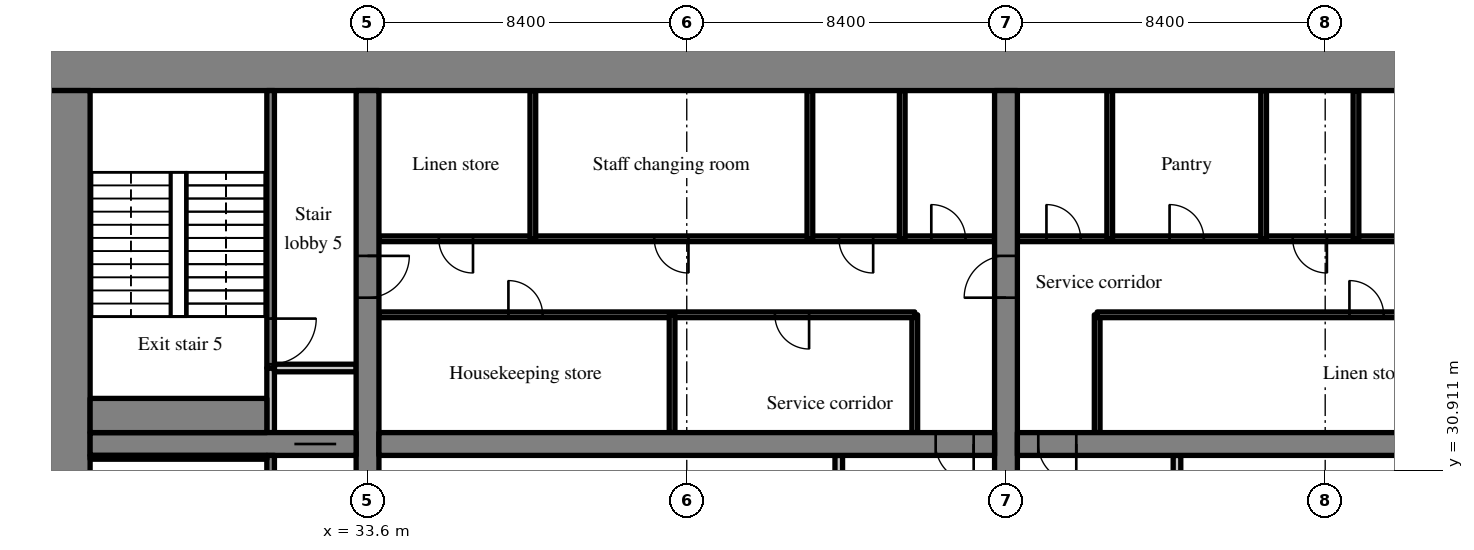
"""IFC4 building model, lengths in metres.
Left out: names, types, materials, properties, quantities, classifications, styles, units other than length and angle.
Written with IfcOpenShell. Run it as: python <this file> out.ifc"""

import sys

from ifc_helpers import new_model, si_unit, direction, frame, frame_2d, origin, place, context, subcontext, project, spatial, rectangle, extrude, source, transform, mapped, element, fill, save


model = new_model("IFC4")
c1 = context("Model", 3, precision=1e-05, world=origin(), true_north=direction((0.0, 1.0)))
c2 = subcontext(c1, "Body", "Model", "MODEL_VIEW")
j1 = project(units=[si_unit("LENGTHUNIT", "METRE"), si_unit("PLANEANGLEUNIT", "RADIAN")], contexts=[c1])
p1 = place(None, origin())
s1 = spatial("IfcSite", under=j1, at=p1, CompositionType="ELEMENT")
p2 = place(p1, origin())
s2 = spatial("IfcBuilding", under=s1, at=p2, CompositionType="ELEMENT")
p3 = place(p2, frame((0.0, 0.0, 27.8)))
s3 = spatial("IfcBuildingStorey", under=s2, at=p3, CompositionType="ELEMENT", Elevation=27.8)
m1 = source(origin(), c2, "Body", "SweptSolid", [
    extrude(rectangle(XDim=50.4, YDim=1.1, at=frame_2d((25.2, 0.0))), origin(), (0.0, 0.0, 1.0), 3.52),
])
p4 = place(p3, frame((25.2, 41.45, 0.0), z_axis=(0.0, 0.0, 1.0), x_axis=(1.0, 0.0, 0.0)))
e1 = element("IfcWall", 1, at=p4, inside=s3, PredefinedType="SHEAR", context=c2, shape_type="MappedRepresentation", body=[
    mapped(m1, transform((0.0, 0.0, 0.0), scale=1.0)),
])
m2 = source(origin(), c2, "Body", "SweptSolid", [
    extrude(rectangle(XDim=17.8, YDim=1.1, at=frame_2d((8.9, 0.0))), origin(), (0.0, 0.0, 1.0), 3.52),
])
p5 = place(p3, frame((25.75, 23.1, 0.0), z_axis=(0.0, 0.0, 1.0), x_axis=(0.0, 1.0, 0.0)))
e2 = element("IfcWall", 2, at=p5, inside=s3, PredefinedType="SHEAR", context=c2, shape_type="MappedRepresentation", body=[
    mapped(m2, transform((0.0, 0.0, 0.0), scale=1.0)),
])
m3 = source(origin(), c2, "Body", "SweptSolid", [
    extrude(rectangle(XDim=17.8, YDim=0.6, at=frame_2d((8.9, 0.0))), origin(), (0.0, 0.0, 1.0), 3.52),
])
p6 = place(p3, frame((33.6, 23.1, 0.0), z_axis=(0.0, 0.0, 1.0), x_axis=(0.0, 1.0, 0.0)))
e3 = element("IfcWall", 3, at=p6, inside=s3, PredefinedType="SHEAR", context=c2, shape_type="MappedRepresentation", body=[
    mapped(m3, transform((0.0, 0.0, 0.0), scale=1.0)),
])
m4 = source(origin(), c2, "Body", "SweptSolid", [
    extrude(rectangle(XDim=1.1, YDim=2.1, at=frame_2d((0.55, 1.05))), frame((0.0, 0.31, 0.0), z_axis=(0.0, -1.0, 0.0), x_axis=(1.0, 0.0, 0.0)), (0.0, 0.0, 1.0), 0.62),
])
p7 = place(p6, frame((12.35, 0.0, 0.0)))
e4 = element("IfcOpeningElement", 4, at=p7, cuts=e3, PredefinedType="OPENING", context=c2, shape_type="MappedRepresentation", body=[
    mapped(m4, transform((0.0, 0.0, 0.0), scale=1.0)),
])
p8 = place(p3, frame((50.4, 23.1, 0.0), z_axis=(0.0, 0.0, 1.0), x_axis=(0.0, 1.0, 0.0)))
e5 = element("IfcWall", 5, at=p8, inside=s3, PredefinedType="SHEAR", context=c2, shape_type="MappedRepresentation", body=[
    mapped(m3, transform((0.0, 0.0, 0.0), scale=1.0)),
])
p9 = place(p8, frame((12.35, 0.0, 0.0)))
e6 = element("IfcOpeningElement", 6, at=p9, cuts=e5, PredefinedType="OPENING", context=c2, shape_type="MappedRepresentation", body=[
    mapped(m4, transform((0.0, 0.0, 0.0), scale=1.0)),
])
m5 = source(origin(), c2, "Body", "SweptSolid", [
    extrude(rectangle(XDim=7.0, YDim=0.6, at=frame_2d((3.5, 0.0))), origin(), (0.0, 0.0, 1.0), 3.52),
])
p10 = place(p3, frame((26.3, 31.6, 0.0), z_axis=(0.0, 0.0, 1.0), x_axis=(1.0, 0.0, 0.0)))
e7 = element("IfcWall", 7, at=p10, inside=s3, PredefinedType="SHEAR", context=c2, shape_type="MappedRepresentation", body=[
    mapped(m5, transform((0.0, 0.0, 0.0), scale=1.0)),
])
p11 = place(p10, frame((5.375, 0.0, 0.0)))
e8 = element("IfcOpeningElement", 8, at=p11, cuts=e7, PredefinedType="OPENING", context=c2, shape_type="MappedRepresentation", body=[
    mapped(m4, transform((0.0, 0.0, 0.0), scale=1.0)),
])
m6 = source(origin(), c2, "Body", "SweptSolid", [
    extrude(rectangle(XDim=16.2, YDim=0.6, at=frame_2d((8.1, 0.0))), origin(), (0.0, 0.0, 1.0), 3.52),
])
p12 = place(p3, frame((33.9, 31.6, 0.0), z_axis=(0.0, 0.0, 1.0), x_axis=(1.0, 0.0, 0.0)))
e9 = element("IfcWall", 9, at=p12, inside=s3, PredefinedType="SHEAR", context=c2, shape_type="MappedRepresentation", body=[
    mapped(m6, transform((0.0, 0.0, 0.0), scale=1.0)),
])
m7 = source(origin(), c2, "Body", "SweptSolid", [
    extrude(rectangle(XDim=1.0, YDim=2.1, at=frame_2d((0.5, 1.05))), frame((0.0, 0.31, 0.0), z_axis=(0.0, -1.0, 0.0), x_axis=(1.0, 0.0, 0.0)), (0.0, 0.0, 1.0), 0.62),
])
p13 = place(p12, frame((14.65, 0.0, 0.0)))
e10 = element("IfcOpeningElement", 10, at=p13, cuts=e9, PredefinedType="OPENING", context=c2, shape_type="MappedRepresentation", body=[
    mapped(m7, transform((0.0, 0.0, 0.0), scale=1.0)),
])
m8 = source(origin(), c2, "Body", "SweptSolid", [
    extrude(rectangle(XDim=16.2, YDim=0.6, at=frame_2d((8.1, 0.0))), origin(), (0.0, 0.0, 1.0), 3.52),
])
p14 = place(p3, frame((50.7, 31.6, 0.0), z_axis=(0.0, 0.0, 1.0), x_axis=(1.0, 0.0, 0.0)))
e11 = element("IfcWall", 11, at=p14, inside=s3, PredefinedType="SHEAR", context=c2, shape_type="MappedRepresentation", body=[
    mapped(m8, transform((0.0, 0.0, 0.0), scale=1.0)),
])
p15 = place(p14, frame((0.55, 0.0, 0.0)))
e12 = element("IfcOpeningElement", 12, at=p15, cuts=e11, PredefinedType="OPENING", context=c2, shape_type="MappedRepresentation", body=[
    mapped(m7, transform((0.0, 0.0, 0.0), scale=1.0)),
])
m9 = source(origin(), c2, "Body", "SweptSolid", [
    extrude(rectangle(XDim=3.559, YDim=0.3, at=frame_2d((1.78, 0.0))), origin(), (0.0, 0.0, 1.0), 3.52),
])
p16 = place(p3, frame((25.55, 39.969, 0.0), z_axis=(0.0, 0.0, 1.0), x_axis=(-0.35779745313, 0.933799219604, 0.0)))
e13 = element("IfcWall", 13, at=p16, inside=s3, PredefinedType="SOLIDWALL", context=c2, shape_type="MappedRepresentation", body=[
    mapped(m9, transform((0.0, 0.0, 0.0), scale=1.0)),
])
m10 = source(origin(), c2, "Body", "SweptSolid", [
    extrude(rectangle(XDim=1.5, YDim=2.0, at=frame_2d((0.75, 1.0))), frame((0.0, 0.16, 0.0), z_axis=(0.0, -1.0, 0.0), x_axis=(1.0, 0.0, 0.0)), (0.0, 0.0, 1.0), 0.32),
])
p17 = place(p16, frame((1.903, 0.0, 0.9)))
e14 = element("IfcOpeningElement", 14, at=p17, cuts=e13, PredefinedType="OPENING", context=c2, shape_type="MappedRepresentation", body=[
    mapped(m10, transform((0.0, 0.0, 0.0), scale=1.0)),
])
m11 = source(origin(), c2, "Body", "SweptSolid", [
    extrude(rectangle(XDim=2.5, YDim=0.2, at=frame_2d((1.25, 0.0))), origin(), (0.0, 0.0, 1.0), 3.52),
])
p18 = place(p3, frame((46.0, 28.8, 0.0), z_axis=(0.0, 0.0, 1.0), x_axis=(0.0, 1.0, 0.0)))
e15 = element("IfcWall", 15, at=p18, inside=s3, PredefinedType="SOLIDWALL", context=c2, shape_type="MappedRepresentation", body=[
    mapped(m11, transform((0.0, 0.0, 0.0), scale=1.0)),
])
m12 = source(origin(), c2, "Body", "SweptSolid", [
    extrude(rectangle(XDim=3.1, YDim=0.15, at=frame_2d((1.55, 0.0))), origin(), (0.0, 0.0, 1.0), 3.52),
])
p19 = place(p3, frame((48.0, 31.9, 0.0), z_axis=(0.0, 0.0, 1.0), x_axis=(0.0, 1.0, 0.0)))
e16 = element("IfcWall", 16, at=p19, inside=s3, PredefinedType="PARTITIONING", context=c2, shape_type="MappedRepresentation", body=[
    mapped(m12, transform((0.0, 0.0, 0.0), scale=1.0)),
])
m13 = source(origin(), c2, "Body", "SweptSolid", [
    extrude(rectangle(XDim=14.1, YDim=0.15, at=frame_2d((7.05, 0.0))), origin(), (0.0, 0.0, 1.0), 3.52),
])
p20 = place(p3, frame((33.9, 35.0, 0.0), z_axis=(0.0, 0.0, 1.0), x_axis=(1.0, 0.0, 0.0)))
e17 = element("IfcWall", 17, at=p20, inside=s3, PredefinedType="PARTITIONING", context=c2, shape_type="MappedRepresentation", body=[
    mapped(m13, transform((0.0, 0.0, 0.0), scale=1.0)),
])
m14 = source(origin(), c2, "Body", "SweptSolid", [
    extrude(rectangle(XDim=0.9, YDim=2.1, at=frame_2d((0.45, 1.05))), frame((0.0, 0.085, 0.0), z_axis=(0.0, -1.0, 0.0), x_axis=(1.0, 0.0, 0.0)), (0.0, 0.0, 1.0), 0.17),
])
p21 = place(p20, frame((3.407, 0.0, 0.0)))
e18 = element("IfcOpeningElement", 18, at=p21, cuts=e17, PredefinedType="OPENING", context=c2, shape_type="MappedRepresentation", body=[
    mapped(m14, transform((0.0, 0.0, 0.0), scale=1.0)),
])
p22 = place(p20, frame((10.419, 0.0, 0.0)))
e19 = element("IfcOpeningElement", 19, at=p22, cuts=e17, PredefinedType="OPENING", context=c2, shape_type="MappedRepresentation", body=[
    mapped(m14, transform((0.0, 0.0, 0.0), scale=1.0)),
])
m15 = source(origin(), c2, "Body", "SweptSolid", [
    extrude(rectangle(XDim=16.2, YDim=0.15, at=frame_2d((8.1, 0.0))), origin(), (0.0, 0.0, 1.0), 3.52),
])
p23 = place(p3, frame((33.9, 37.0, 0.0), z_axis=(0.0, 0.0, 1.0), x_axis=(1.0, 0.0, 0.0)))
e20 = element("IfcWall", 20, at=p23, inside=s3, PredefinedType="PARTITIONING", context=c2, shape_type="MappedRepresentation", body=[
    mapped(m15, transform((0.0, 0.0, 0.0), scale=1.0)),
])
p24 = place(p23, frame((1.575, 0.0, 0.0)))
e21 = element("IfcOpeningElement", 21, at=p24, cuts=e20, PredefinedType="OPENING", context=c2, shape_type="MappedRepresentation", body=[
    mapped(m14, transform((0.0, 0.0, 0.0), scale=1.0)),
])
p25 = place(p23, frame((7.245, 0.0, 0.0)))
e22 = element("IfcOpeningElement", 22, at=p25, cuts=e20, PredefinedType="OPENING", context=c2, shape_type="MappedRepresentation", body=[
    mapped(m14, transform((0.0, 0.0, 0.0), scale=1.0)),
])
p26 = place(p23, frame((12.105, 0.0, 0.0)))
e23 = element("IfcOpeningElement", 23, at=p26, cuts=e20, PredefinedType="OPENING", context=c2, shape_type="MappedRepresentation", body=[
    mapped(m14, transform((0.0, 0.0, 0.0), scale=1.0)),
])
p27 = place(p23, frame((14.535, 0.0, 0.0)))
e24 = element("IfcOpeningElement", 24, at=p27, cuts=e20, PredefinedType="OPENING", context=c2, shape_type="MappedRepresentation", body=[
    mapped(m14, transform((0.0, 0.0, 0.0), scale=1.0)),
])
p28 = place(p3, frame((41.614, 31.9, 0.0), z_axis=(0.0, 0.0, 1.0), x_axis=(0.0, 1.0, 0.0)))
e25 = element("IfcWall", 25, at=p28, inside=s3, PredefinedType="PARTITIONING", context=c2, shape_type="MappedRepresentation", body=[
    mapped(m12, transform((0.0, 0.0, 0.0), scale=1.0)),
])
m16 = source(origin(), c2, "Body", "SweptSolid", [
    extrude(rectangle(XDim=3.9, YDim=0.15, at=frame_2d((1.95, 0.0))), origin(), (0.0, 0.0, 1.0), 3.52),
])
for number, where, z_axis, x_axis in (
    (26, (37.95, 37.0, 0.0), (0.0, 0.0, 1.0), (0.0, 1.0, 0.0)),
    (27, (45.24, 37.0, 0.0), (0.0, 0.0, 1.0), (0.0, 1.0, 0.0)),
    (28, (47.67, 37.0, 0.0), (0.0, 0.0, 1.0), (0.0, 1.0, 0.0)),
):
    element("IfcWall", number, at=place(p3, frame(where, z_axis=z_axis, x_axis=x_axis)), inside=s3, PredefinedType="PARTITIONING", context=c2, shape_type="MappedRepresentation", body=[
        mapped(m16, transform((0.0, 0.0, 0.0), scale=1.0)),
    ])
m17 = source(origin(), c2, "Body", "SweptSolid", [
    extrude(rectangle(XDim=8.2, YDim=0.2, at=frame_2d((4.1, 0.0))), origin(), (0.0, 0.0, 1.0), 3.52),
])
p29 = place(p3, frame((54.9, 23.1, 0.0), z_axis=(0.0, 0.0, 1.0), x_axis=(0.0, 1.0, 0.0)))
e29 = element("IfcWall", 29, at=p29, inside=s3, PredefinedType="PARTITIONING", context=c2, shape_type="MappedRepresentation", body=[
    mapped(m17, transform((0.0, 0.0, 0.0), scale=1.0)),
])
p30 = place(p3, frame((52.8, 31.9, 0.0), z_axis=(0.0, 0.0, 1.0), x_axis=(0.0, 1.0, 0.0)))
e30 = element("IfcWall", 30, at=p30, inside=s3, PredefinedType="PARTITIONING", context=c2, shape_type="MappedRepresentation", body=[
    mapped(m12, transform((0.0, 0.0, 0.0), scale=1.0)),
])
m18 = source(origin(), c2, "Body", "SweptSolid", [
    extrude(rectangle(XDim=14.1, YDim=0.15, at=frame_2d((7.05, 0.0))), origin(), (0.0, 0.0, 1.0), 3.52),
])
p31 = place(p3, frame((66.9, 35.0, 0.0), z_axis=(0.0, 0.0, 1.0), x_axis=(-1.0, 0.0, 0.0)))
e31 = element("IfcWall", 31, at=p31, inside=s3, PredefinedType="PARTITIONING", context=c2, shape_type="MappedRepresentation", body=[
    mapped(m18, transform((0.0, 0.0, 0.0), scale=1.0)),
])
p32 = place(p31, frame((6.562, 0.0, 0.0)))
e32 = element("IfcOpeningElement", 32, at=p32, cuts=e31, PredefinedType="OPENING", context=c2, shape_type="MappedRepresentation", body=[
    mapped(m14, transform((0.0, 0.0, 0.0), scale=1.0)),
])
m19 = source(origin(), c2, "Body", "SweptSolid", [
    extrude(rectangle(XDim=16.2, YDim=0.15, at=frame_2d((8.1, 0.0))), origin(), (0.0, 0.0, 1.0), 3.52),
])
p33 = place(p3, frame((66.9, 37.0, 0.0), z_axis=(0.0, 0.0, 1.0), x_axis=(-1.0, 0.0, 0.0)))
e33 = element("IfcWall", 33, at=p33, inside=s3, PredefinedType="PARTITIONING", context=c2, shape_type="MappedRepresentation", body=[
    mapped(m19, transform((0.0, 0.0, 0.0), scale=1.0)),
])
p34 = place(p33, frame((3.195, 0.0, 0.0)))
e34 = element("IfcOpeningElement", 34, at=p34, cuts=e33, PredefinedType="OPENING", context=c2, shape_type="MappedRepresentation", body=[
    mapped(m14, transform((0.0, 0.0, 0.0), scale=1.0)),
])
p35 = place(p33, frame((8.055, 0.0, 0.0)))
e35 = element("IfcOpeningElement", 35, at=p35, cuts=e33, PredefinedType="OPENING", context=c2, shape_type="MappedRepresentation", body=[
    mapped(m14, transform((0.0, 0.0, 0.0), scale=1.0)),
])
p36 = place(p33, frame((11.295, 0.0, 0.0)))
e36 = element("IfcOpeningElement", 36, at=p36, cuts=e33, PredefinedType="OPENING", context=c2, shape_type="MappedRepresentation", body=[
    mapped(m14, transform((0.0, 0.0, 0.0), scale=1.0)),
])
p37 = place(p33, frame((14.535, 0.0, 0.0)))
e37 = element("IfcOpeningElement", 37, at=p37, cuts=e33, PredefinedType="OPENING", context=c2, shape_type="MappedRepresentation", body=[
    mapped(m14, transform((0.0, 0.0, 0.0), scale=1.0)),
])
for number, where, z_axis, x_axis in (
    (38, (59.61, 37.0, 0.0), (0.0, 0.0, 1.0), (0.0, 1.0, 0.0)),
    (39, (57.18, 37.0, 0.0), (0.0, 0.0, 1.0), (0.0, 1.0, 0.0)),
    (40, (53.13, 37.0, 0.0), (0.0, 0.0, 1.0), (0.0, 1.0, 0.0)),
):
    element("IfcWall", number, at=place(p3, frame(where, z_axis=z_axis, x_axis=x_axis)), inside=s3, PredefinedType="PARTITIONING", context=c2, shape_type="MappedRepresentation", body=[
        mapped(m16, transform((0.0, 0.0, 0.0), scale=1.0)),
    ])
m20 = source(origin(), c2, "Body", "SweptSolid", [
    extrude(rectangle(XDim=8.2, YDim=0.2, at=frame_2d((4.1, 0.0))), origin(), (0.0, 0.0, 1.0), 3.52),
])
p38 = place(p3, frame((31.05, 23.1, 0.0), z_axis=(0.0, 0.0, 1.0), x_axis=(0.0, 1.0, 0.0)))
e41 = element("IfcWall", 41, at=p38, inside=s3, PredefinedType="SOLIDWALL", context=c2, shape_type="MappedRepresentation", body=[
    mapped(m20, transform((0.0, 0.0, 0.0), scale=1.0)),
])
m21 = source(origin(), c2, "Body", "SweptSolid", [
    extrude(rectangle(XDim=1.2, YDim=2.1, at=frame_2d((0.6, 1.05))), frame((0.0, 0.11, 0.0), z_axis=(0.0, -1.0, 0.0), x_axis=(1.0, 0.0, 0.0)), (0.0, 0.0, 1.0), 0.22),
])
p39 = place(p38, frame((0.5, 0.0, 0.0)))
e42 = element("IfcOpeningElement", 42, at=p39, cuts=e41, PredefinedType="OPENING", context=c2, shape_type="MappedRepresentation", body=[
    mapped(m21, transform((0.0, 0.0, 0.0), scale=1.0)),
])
m22 = source(origin(), c2, "Body", "SweptSolid", [
    extrude(rectangle(XDim=1.7, YDim=0.2, at=frame_2d((0.85, 0.0))), origin(), (0.0, 0.0, 1.0), 3.52),
])
p40 = place(p3, frame((31.05, 31.9, 0.0), z_axis=(0.0, 0.0, 1.0), x_axis=(0.0, 1.0, 0.0)))
e43 = element("IfcWall", 43, at=p40, inside=s3, PredefinedType="SOLIDWALL", context=c2, shape_type="MappedRepresentation", body=[
    mapped(m22, transform((0.0, 0.0, 0.0), scale=1.0)),
])
m23 = source(origin(), c2, "Body", "SweptSolid", [
    extrude(rectangle(XDim=2.15, YDim=0.2, at=frame_2d((1.075, 0.0))), origin(), (0.0, 0.0, 1.0), 3.52),
])
p41 = place(p3, frame((31.15, 33.6, 0.0), z_axis=(0.0, 0.0, 1.0), x_axis=(1.0, 0.0, 0.0)))
e44 = element("IfcWall", 44, at=p41, inside=s3, PredefinedType="SOLIDWALL", context=c2, shape_type="MappedRepresentation", body=[
    mapped(m23, transform((0.0, 0.0, 0.0), scale=1.0)),
])
m24 = source(origin(), c2, "Body", "SweptSolid", [
    extrude(rectangle(XDim=7.3, YDim=0.2, at=frame_2d((3.65, 0.0))), origin(), (0.0, 0.0, 1.0), 3.52),
])
p42 = place(p3, frame((31.05, 33.6, 0.0), z_axis=(0.0, 0.0, 1.0), x_axis=(0.0, 1.0, 0.0)))
e45 = element("IfcWall", 45, at=p42, inside=s3, PredefinedType="SOLIDWALL", context=c2, shape_type="MappedRepresentation", body=[
    mapped(m24, transform((0.0, 0.0, 0.0), scale=1.0)),
])
p43 = place(p42, frame((0.1, 0.0, 0.0)))
e46 = element("IfcOpeningElement", 46, at=p43, cuts=e45, PredefinedType="OPENING", context=c2, shape_type="MappedRepresentation", body=[
    mapped(m21, transform((0.0, 0.0, 0.0), scale=1.0)),
])
m25 = source(origin(), c2, "Body", "SweptSolid", [
    extrude(rectangle(XDim=4.65, YDim=0.1, at=frame_2d((2.325, 0.0))), origin(), (0.0, 0.0, 1.0), 3.52),
])
p44 = place(p3, frame((26.3, 31.25, 0.0), z_axis=(0.0, 0.0, 1.0), x_axis=(1.0, 0.0, 0.0)))
e47 = element("IfcWall", 47, at=p44, inside=s3, PredefinedType="SOLIDWALL", context=c2, shape_type="MappedRepresentation", body=[
    mapped(m25, transform((0.0, 0.0, 0.0), scale=1.0)),
])
m26 = source(origin(), c2, "Body", "SweptSolid", [
    extrude(rectangle(XDim=4.65, YDim=0.9, at=frame_2d((2.325, 0.0))), origin(), (0.0, 0.0, 1.0), 3.52),
])
p45 = place(p3, frame((26.3, 32.35, 0.0), z_axis=(0.0, 0.0, 1.0), x_axis=(1.0, 0.0, 0.0)))
e48 = element("IfcWall", 48, at=p45, inside=s3, PredefinedType="SOLIDWALL", context=c2, shape_type="MappedRepresentation", body=[
    mapped(m26, transform((0.0, 0.0, 0.0), scale=1.0)),
])
m27 = source(origin(), c2, "Body", "SweptSolid", [
    extrude(rectangle(XDim=1.0, YDim=2.1, at=frame_2d((0.5, 1.05))), frame((0.0, 0.025, 0.0), z_axis=(0.0, -1.0, 0.0), x_axis=(1.0, 0.0, 0.0)), (0.0, 0.0, 1.0), 0.05),
])
p46 = place(p13, origin())
e49 = element("IfcDoor", 49, at=p46, inside=s3, OperationType="SINGLE_SWING_RIGHT", PredefinedType="DOOR", context=c2, shape_type="MappedRepresentation", body=[
    mapped(m27, transform((0.0, 0.0, 0.0), scale=1.0)),
])
fill(e10, e49)
m28 = source(origin(), c2, "Body", "SweptSolid", [
    extrude(rectangle(XDim=0.9, YDim=2.1, at=frame_2d((0.45, 1.05))), frame((0.0, 0.025, 0.0), z_axis=(0.0, -1.0, 0.0), x_axis=(1.0, 0.0, 0.0)), (0.0, 0.0, 1.0), 0.05),
])
p47 = place(p21, origin())
e50 = element("IfcDoor", 50, at=p47, inside=s3, OperationType="SINGLE_SWING_LEFT", PredefinedType="DOOR", context=c2, shape_type="MappedRepresentation", body=[
    mapped(m28, transform((0.0, 0.0, 0.0), scale=1.0)),
])
fill(e18, e50)
p48 = place(p22, origin())
e51 = element("IfcDoor", 51, at=p48, inside=s3, OperationType="SINGLE_SWING_RIGHT", PredefinedType="DOOR", context=c2, shape_type="MappedRepresentation", body=[
    mapped(m28, transform((0.0, 0.0, 0.0), scale=1.0)),
])
fill(e19, e51)
p49 = place(p24, origin())
e52 = element("IfcDoor", 52, at=p49, inside=s3, OperationType="SINGLE_SWING_RIGHT", PredefinedType="DOOR", context=c2, shape_type="MappedRepresentation", body=[
    mapped(m28, transform((0.0, 0.0, 0.0), scale=1.0)),
])
fill(e21, e52)
p50 = place(p25, origin())
e53 = element("IfcDoor", 53, at=p50, inside=s3, OperationType="SINGLE_SWING_RIGHT", PredefinedType="DOOR", context=c2, shape_type="MappedRepresentation", body=[
    mapped(m28, transform((0.0, 0.0, 0.0), scale=1.0)),
])
fill(e22, e53)
p51 = place(p26, origin())
e54 = element("IfcDoor", 54, at=p51, inside=s3, OperationType="SINGLE_SWING_RIGHT", PredefinedType="DOOR", context=c2, shape_type="MappedRepresentation", body=[
    mapped(m28, transform((0.0, 0.0, 0.0), scale=1.0)),
])
fill(e23, e54)
p52 = place(p27, origin())
e55 = element("IfcDoor", 55, at=p52, inside=s3, OperationType="SINGLE_SWING_LEFT", PredefinedType="DOOR", context=c2, shape_type="MappedRepresentation", body=[
    mapped(m28, transform((0.0, 0.0, 0.0), scale=1.0)),
])
fill(e24, e55)
p53 = place(p15, origin())
e56 = element("IfcDoor", 56, at=p53, inside=s3, OperationType="SINGLE_SWING_RIGHT", PredefinedType="DOOR", context=c2, shape_type="MappedRepresentation", body=[
    mapped(m27, transform((0.0, 0.0, 0.0), scale=1.0)),
])
fill(e12, e56)
p54 = place(p32, origin())
e57 = element("IfcDoor", 57, at=p54, inside=s3, OperationType="SINGLE_SWING_RIGHT", PredefinedType="DOOR", context=c2, shape_type="MappedRepresentation", body=[
    mapped(m28, transform((0.0, 0.0, 0.0), scale=1.0)),
])
fill(e32, e57)
p55 = place(p35, origin())
e58 = element("IfcDoor", 58, at=p55, inside=s3, OperationType="SINGLE_SWING_LEFT", PredefinedType="DOOR", context=c2, shape_type="MappedRepresentation", body=[
    mapped(m28, transform((0.0, 0.0, 0.0), scale=1.0)),
])
fill(e35, e58)
p56 = place(p36, origin())
e59 = element("IfcDoor", 59, at=p56, inside=s3, OperationType="SINGLE_SWING_RIGHT", PredefinedType="DOOR", context=c2, shape_type="MappedRepresentation", body=[
    mapped(m28, transform((0.0, 0.0, 0.0), scale=1.0)),
])
fill(e36, e59)
p57 = place(p37, origin())
e60 = element("IfcDoor", 60, at=p57, inside=s3, OperationType="SINGLE_SWING_RIGHT", PredefinedType="DOOR", context=c2, shape_type="MappedRepresentation", body=[
    mapped(m28, transform((0.0, 0.0, 0.0), scale=1.0)),
])
fill(e37, e60)
m29 = source(origin(), c2, "Body", "SweptSolid", [
    extrude(rectangle(XDim=1.1, YDim=2.1, at=frame_2d((0.55, 1.05))), frame((0.0, 0.025, 0.0), z_axis=(0.0, -1.0, 0.0), x_axis=(1.0, 0.0, 0.0)), (0.0, 0.0, 1.0), 0.05),
])
p58 = place(p11, origin())
e61 = element("IfcDoor", 61, at=p58, inside=s3, OperationType="SLIDING_TO_RIGHT", PredefinedType="DOOR", context=c2, shape_type="MappedRepresentation", body=[
    mapped(m29, transform((0.0, 0.0, 0.0), scale=1.0)),
])
fill(e8, e61)
m30 = source(origin(), c2, "Body", "SweptSolid", [
    extrude(rectangle(XDim=1.2, YDim=2.1, at=frame_2d((0.6, 1.05))), frame((0.0, 0.025, 0.0), z_axis=(0.0, -1.0, 0.0), x_axis=(1.0, 0.0, 0.0)), (0.0, 0.0, 1.0), 0.05),
])
p59 = place(p43, origin())
e62 = element("IfcDoor", 62, at=p59, inside=s3, OperationType="SINGLE_SWING_RIGHT", PredefinedType="DOOR", context=c2, shape_type="MappedRepresentation", body=[
    mapped(m30, transform((0.0, 0.0, 0.0), scale=1.0)),
])
fill(e46, e62)
p60 = place(p7, origin())
e63 = element("IfcDoor", 63, at=p60, inside=s3, OperationType="SINGLE_SWING_RIGHT", PredefinedType="DOOR", context=c2, shape_type="MappedRepresentation", body=[
    mapped(m29, transform((0.0, 0.0, 0.0), scale=1.0)),
])
fill(e4, e63)
p61 = place(p9, origin())
e64 = element("IfcDoor", 64, at=p61, inside=s3, OperationType="SINGLE_SWING_LEFT", PredefinedType="DOOR", context=c2, shape_type="MappedRepresentation", body=[
    mapped(m29, transform((0.0, 0.0, 0.0), scale=1.0)),
])
fill(e6, e64)
save(model, sys.argv[1])
